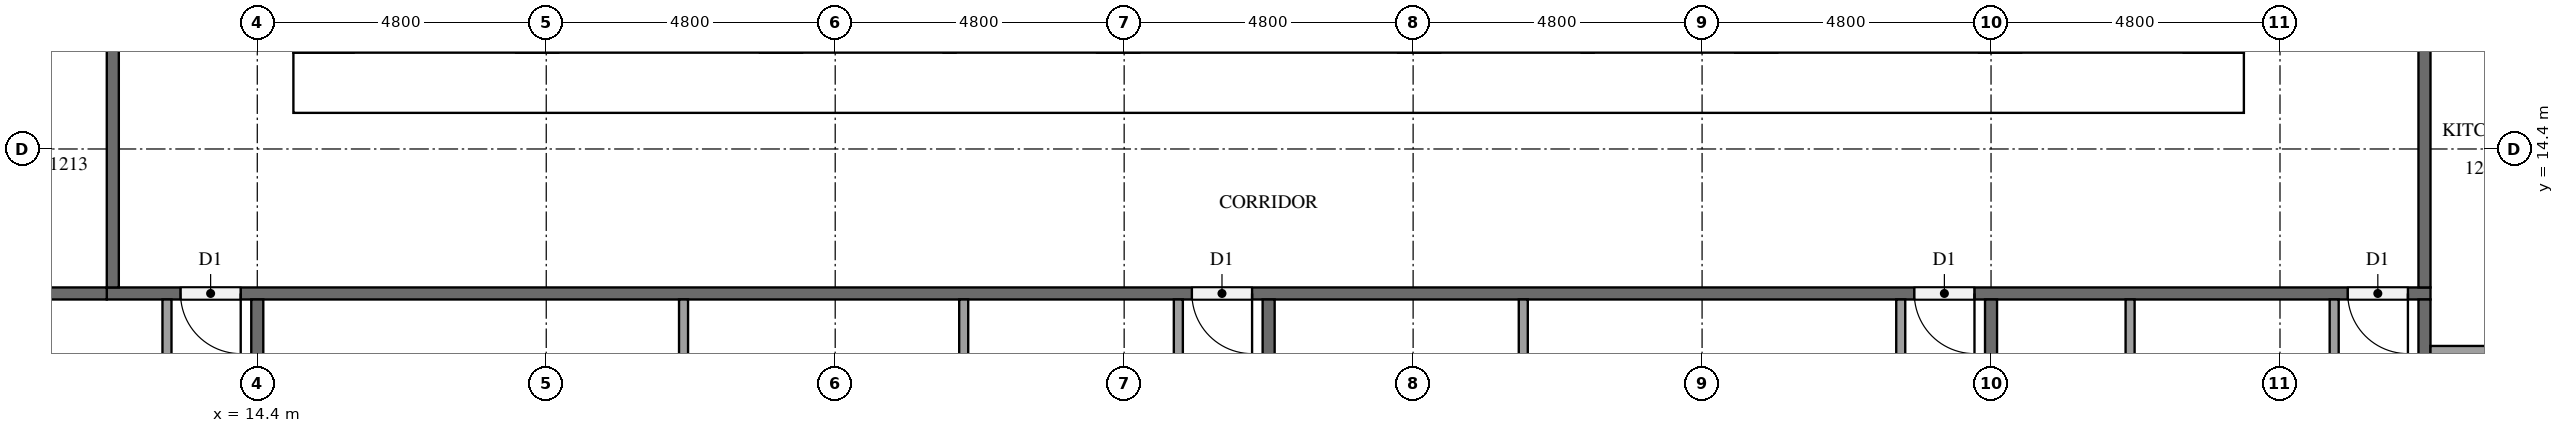
"""IFC4 building model, lengths in metres.
Left out: names, types, materials, properties, quantities, classifications, styles, units other than length and angle.
Written with IfcOpenShell. Run it as: python <this file> out.ifc"""

import sys

from ifc_helpers import new_model, si_unit, direction, frame, frame_2d, origin, place, context, subcontext, project, spatial, rectangle, extrude, element, fill, save


model = new_model("IFC4")
c1 = context("Model", 3, precision=1e-05, world=origin(), true_north=direction((0.0, 1.0)))
c2 = subcontext(c1, "Body", "Model", "MODEL_VIEW")
j1 = project(units=[si_unit("LENGTHUNIT", "METRE"), si_unit("PLANEANGLEUNIT", "RADIAN")], contexts=[c1])
p1 = place(None, origin())
s1 = spatial("IfcSite", under=j1, at=p1, CompositionType="ELEMENT")
p2 = place(p1, origin())
s2 = spatial("IfcBuilding", under=s1, at=p2, CompositionType="ELEMENT")
p3 = place(p2, frame((0.0, 0.0, 50.4)))
s3 = spatial("IfcBuildingStorey", under=s2, at=p3, CompositionType="ELEMENT", Elevation=50.4)
p4 = place(p3, frame((15.0, 15.5, 0.0), z_axis=(0.0, 0.0, 1.0), x_axis=(1.0, 0.0, 0.0)))
e1 = element("IfcWall", 1, at=p4, inside=s3, PredefinedType="SHEAR", context=c2, shape_type="SweptSolid", body=[
    extrude(rectangle(XDim=32.4, YDim=1.0, at=frame_2d((16.2, 0.0))), origin(), (0.0, 0.0, 1.0), 3.1),
])
p5 = place(p4, frame((15.3, 0.0, 0.0)))
e2 = element("IfcOpeningElement", 2, at=p5, cuts=e1, PredefinedType="OPENING", context=c2, shape_type="SweptSolid", body=[
    extrude(rectangle(XDim=1.8, YDim=2.1, at=frame_2d((0.9, 1.05))), frame((0.0, 0.51, 0.0), z_axis=(0.0, -1.0, 0.0), x_axis=(1.0, 0.0, 0.0)), (0.0, 0.0, 1.0), 1.02),
])
p6 = place(p3, frame((15.5, 16.0, 0.0), z_axis=(0.0, 0.0, 1.0), x_axis=(0.0, 1.0, 0.0)))
e3 = element("IfcWall", 3, at=p6, inside=s3, PredefinedType="SHEAR", context=c2, shape_type="SweptSolid", body=[
    extrude(rectangle(XDim=20.8, YDim=1.0, at=frame_2d((10.4, 0.0))), origin(), (0.0, 0.0, 1.0), 3.1),
])
p7 = place(p6, frame((4.76, 0.0, 0.0)))
e4 = element("IfcOpeningElement", 4, at=p7, cuts=e3, PredefinedType="OPENING", context=c2, shape_type="SweptSolid", body=[
    extrude(rectangle(XDim=1.2, YDim=2.1, at=frame_2d((0.6, 1.05))), frame((0.0, 0.51, 0.0), z_axis=(0.0, -1.0, 0.0), x_axis=(1.0, 0.0, 0.0)), (0.0, 0.0, 1.0), 1.02),
])
p8 = place(p3, frame((46.9, 16.0, 0.0), z_axis=(0.0, 0.0, 1.0), x_axis=(0.0, 1.0, 0.0)))
e5 = element("IfcWall", 5, at=p8, inside=s3, PredefinedType="SHEAR", context=c2, shape_type="SweptSolid", body=[
    extrude(rectangle(XDim=20.8, YDim=1.0, at=frame_2d((10.4, 0.0))), origin(), (0.0, 0.0, 1.0), 3.1),
])
p9 = place(p8, frame((10.1, 0.0, 0.0)))
e6 = element("IfcOpeningElement", 6, at=p9, cuts=e5, PredefinedType="OPENING", context=c2, shape_type="SweptSolid", body=[
    extrude(rectangle(XDim=1.2, YDim=2.1, at=frame_2d((0.6, 1.05))), frame((0.0, 0.51, 0.0), z_axis=(0.0, -1.0, 0.0), x_axis=(1.0, 0.0, 0.0)), (0.0, 0.0, 1.0), 1.02),
])
p10 = place(p3, frame((23.1, 16.0, 0.0), z_axis=(0.0, 0.0, 1.0), x_axis=(0.0, 1.0, 0.0)))
e7 = element("IfcWall", 7, at=p10, inside=s3, PredefinedType="SHEAR", context=c2, shape_type="SweptSolid", body=[
    extrude(rectangle(XDim=20.8, YDim=0.7, at=frame_2d((10.4, 0.0))), origin(), (0.0, 0.0, 1.0), 3.1),
])
p11 = place(p3, frame((50.5, 12.0, 0.0), z_axis=(0.0, 0.0, 1.0), x_axis=(-1.0, 0.0, 0.0)))
e8 = element("IfcWall", 8, at=p11, inside=s3, PredefinedType="PARTITIONING", context=c2, shape_type="SweptSolid", body=[
    extrude(rectangle(XDim=38.6, YDim=0.2, at=frame_2d((19.3, 0.0))), origin(), (0.0, 0.0, 1.0), 3.1),
])
p12 = place(p11, frame((36.375, 0.0, 0.0)))
e9 = element("IfcOpeningElement", 9, at=p12, cuts=e8, PredefinedType="OPENING", context=c2, shape_type="SweptSolid", body=[
    extrude(rectangle(XDim=1.0, YDim=2.1, at=frame_2d((0.5, 1.05))), frame((0.0, 0.11, 0.0), z_axis=(0.0, -1.0, 0.0), x_axis=(1.0, 0.0, 0.0)), (0.0, 0.0, 1.0), 0.22),
])
p13 = place(p11, frame((19.575, 0.0, 0.0)))
e10 = element("IfcOpeningElement", 10, at=p13, cuts=e8, PredefinedType="OPENING", context=c2, shape_type="SweptSolid", body=[
    extrude(rectangle(XDim=1.0, YDim=2.1, at=frame_2d((0.5, 1.05))), frame((0.0, 0.11, 0.0), z_axis=(0.0, -1.0, 0.0), x_axis=(1.0, 0.0, 0.0)), (0.0, 0.0, 1.0), 0.22),
])
p14 = place(p11, frame((7.575, 0.0, 0.0)))
e11 = element("IfcOpeningElement", 11, at=p14, cuts=e8, PredefinedType="OPENING", context=c2, shape_type="SweptSolid", body=[
    extrude(rectangle(XDim=1.0, YDim=2.1, at=frame_2d((0.5, 1.05))), frame((0.0, 0.11, 0.0), z_axis=(0.0, -1.0, 0.0), x_axis=(1.0, 0.0, 0.0)), (0.0, 0.0, 1.0), 0.22),
])
p15 = place(p11, frame((0.375, 0.0, 0.0)))
e12 = element("IfcOpeningElement", 12, at=p15, cuts=e8, PredefinedType="OPENING", context=c2, shape_type="SweptSolid", body=[
    extrude(rectangle(XDim=1.0, YDim=2.1, at=frame_2d((0.5, 1.05))), frame((0.0, 0.11, 0.0), z_axis=(0.0, -1.0, 0.0), x_axis=(1.0, 0.0, 0.0)), (0.0, 0.0, 1.0), 0.22),
])
p16 = place(p3, frame((50.4, 40.7, 0.0), z_axis=(0.0, 0.0, 1.0), x_axis=(0.0, -1.0, 0.0)))
e13 = element("IfcWall", 13, at=p16, inside=s3, PredefinedType="PARTITIONING", context=c2, shape_type="SweptSolid", body=[
    extrude(rectangle(XDim=28.6, YDim=0.2, at=frame_2d((14.3, 0.0))), origin(), (0.0, 0.0, 1.0), 3.1),
])
p17 = place(p16, frame((21.725, 0.0, 0.0)))
e14 = element("IfcOpeningElement", 14, at=p17, cuts=e13, PredefinedType="OPENING", context=c2, shape_type="SweptSolid", body=[
    extrude(rectangle(XDim=1.1, YDim=2.1, at=frame_2d((0.55, 1.05))), frame((0.0, 0.11, 0.0), z_axis=(0.0, -1.0, 0.0), x_axis=(1.0, 0.0, 0.0)), (0.0, 0.0, 1.0), 0.22),
])
p18 = place(p16, frame((12.175, 0.0, 0.0)))
e15 = element("IfcOpeningElement", 15, at=p18, cuts=e13, PredefinedType="OPENING", context=c2, shape_type="SweptSolid", body=[
    extrude(rectangle(XDim=1.0, YDim=2.1, at=frame_2d((0.5, 1.05))), frame((0.0, 0.11, 0.0), z_axis=(0.0, -1.0, 0.0), x_axis=(1.0, 0.0, 0.0)), (0.0, 0.0, 1.0), 0.22),
])
p19 = place(p16, frame((10.625, 0.0, 0.0)))
e16 = element("IfcOpeningElement", 16, at=p19, cuts=e13, PredefinedType="OPENING", context=c2, shape_type="SweptSolid", body=[
    extrude(rectangle(XDim=1.0, YDim=2.1, at=frame_2d((0.5, 1.05))), frame((0.0, 0.11, 0.0), z_axis=(0.0, -1.0, 0.0), x_axis=(1.0, 0.0, 0.0)), (0.0, 0.0, 1.0), 0.22),
])
p20 = place(p3, frame((12.0, 12.1, 0.0), z_axis=(0.0, 0.0, 1.0), x_axis=(0.0, 1.0, 0.0)))
e17 = element("IfcWall", 17, at=p20, inside=s3, PredefinedType="PARTITIONING", context=c2, shape_type="SweptSolid", body=[
    extrude(rectangle(XDim=28.6, YDim=0.2, at=frame_2d((14.3, 0.0))), origin(), (0.0, 0.0, 1.0), 3.1),
])
p21 = place(p20, frame((12.175, 0.0, 0.0)))
e18 = element("IfcOpeningElement", 18, at=p21, cuts=e17, PredefinedType="OPENING", context=c2, shape_type="SweptSolid", body=[
    extrude(rectangle(XDim=1.0, YDim=2.1, at=frame_2d((0.5, 1.05))), frame((0.0, 0.11, 0.0), z_axis=(0.0, -1.0, 0.0), x_axis=(1.0, 0.0, 0.0)), (0.0, 0.0, 1.0), 0.22),
])
p22 = place(p20, frame((10.625, 0.0, 0.0)))
e19 = element("IfcOpeningElement", 19, at=p22, cuts=e17, PredefinedType="OPENING", context=c2, shape_type="SweptSolid", body=[
    extrude(rectangle(XDim=1.0, YDim=2.1, at=frame_2d((0.5, 1.05))), frame((0.0, 0.11, 0.0), z_axis=(0.0, -1.0, 0.0), x_axis=(1.0, 0.0, 0.0)), (0.0, 0.0, 1.0), 0.22),
])
p23 = place(p3, frame((14.4, 11.9, 0.0), z_axis=(0.0, 0.0, 1.0), x_axis=(0.0, -1.0, 0.0)))
e20 = element("IfcWall", 20, at=p23, inside=s3, PredefinedType="PARTITIONING", context=c2, shape_type="SweptSolid", body=[
    extrude(rectangle(XDim=11.45, YDim=0.2, at=frame_2d((5.725, 0.0))), origin(), (0.0, 0.0, 1.0), 3.1),
])
for number, where, z_axis, x_axis in (
    (21, (0.1, 12.0, 0.0), (0.0, 0.0, 1.0), (1.0, 0.0, 0.0)),
    (22, (31.2, 11.9, 0.0), (0.0, 0.0, 1.0), (0.0, -1.0, 0.0)),
):
    element("IfcWall", number, at=place(p3, frame(where, z_axis=z_axis, x_axis=x_axis)), inside=s3, PredefinedType="PARTITIONING", context=c2, shape_type="SweptSolid", body=[
        extrude(rectangle(XDim=11.8, YDim=0.2, at=frame_2d((5.9, 0.0))), origin(), (0.0, 0.0, 1.0), 3.1),
    ])
p24 = place(p3, frame((43.2, 11.9, 0.0), z_axis=(0.0, 0.0, 1.0), x_axis=(0.0, -1.0, 0.0)))
e23 = element("IfcWall", 23, at=p24, inside=s3, PredefinedType="PARTITIONING", context=c2, shape_type="SweptSolid", body=[
    extrude(rectangle(XDim=11.45, YDim=0.2, at=frame_2d((5.725, 0.0))), origin(), (0.0, 0.0, 1.0), 3.1),
])
p25 = place(p3, frame((50.4, 11.9, 0.0), z_axis=(0.0, 0.0, 1.0), x_axis=(0.0, -1.0, 0.0)))
e24 = element("IfcWall", 24, at=p25, inside=s3, PredefinedType="PARTITIONING", context=c2, shape_type="SweptSolid", body=[
    extrude(rectangle(XDim=11.8, YDim=0.2, at=frame_2d((5.9, 0.0))), origin(), (0.0, 0.0, 1.0), 3.1),
])
p26 = place(p3, frame((12.9, 11.9, 0.0), z_axis=(0.0, 0.0, 1.0), x_axis=(0.0, -1.0, 0.0)))
e25 = element("IfcWall", 25, at=p26, inside=s3, PredefinedType="PARTITIONING", context=c2, shape_type="SweptSolid", body=[
    extrude(rectangle(XDim=4.025, YDim=0.15, at=frame_2d((2.012, 0.0))), origin(), (0.0, 0.0, 1.0), 3.1),
])
for number, where, z_axis, x_axis in (
    (26, (26.135, 11.9, 0.0), (0.0, 0.0, 1.0), (0.0, -1.0, 0.0)),
    (27, (21.481, 11.9, 0.0), (0.0, 0.0, 1.0), (0.0, -1.0, 0.0)),
):
    element("IfcWall", number, at=place(p3, frame(where, z_axis=z_axis, x_axis=x_axis)), inside=s3, PredefinedType="PARTITIONING", context=c2, shape_type="SweptSolid", body=[
        extrude(rectangle(XDim=3.575, YDim=0.15, at=frame_2d((1.788, 0.0))), origin(), (0.0, 0.0, 1.0), 3.1),
    ])
p27 = place(p3, frame((29.7, 11.9, 0.0), z_axis=(0.0, 0.0, 1.0), x_axis=(0.0, -1.0, 0.0)))
e28 = element("IfcWall", 28, at=p27, inside=s3, PredefinedType="PARTITIONING", context=c2, shape_type="SweptSolid", body=[
    extrude(rectangle(XDim=3.725, YDim=0.15, at=frame_2d((1.862, 0.0))), origin(), (0.0, 0.0, 1.0), 3.1),
])
p28 = place(p3, frame((35.43, 11.9, 0.0), z_axis=(0.0, 0.0, 1.0), x_axis=(0.0, -1.0, 0.0)))
e29 = element("IfcWall", 29, at=p28, inside=s3, PredefinedType="PARTITIONING", context=c2, shape_type="SweptSolid", body=[
    extrude(rectangle(XDim=3.275, YDim=0.15, at=frame_2d((1.637, 0.0))), origin(), (0.0, 0.0, 1.0), 3.1),
])
p29 = place(p3, frame((41.7, 11.9, 0.0), z_axis=(0.0, 0.0, 1.0), x_axis=(0.0, -1.0, 0.0)))
e30 = element("IfcWall", 30, at=p29, inside=s3, PredefinedType="PARTITIONING", context=c2, shape_type="SweptSolid", body=[
    extrude(rectangle(XDim=3.425, YDim=0.15, at=frame_2d((1.712, 0.0))), origin(), (0.0, 0.0, 1.0), 3.1),
])
p30 = place(p3, frame((45.51, 11.9, 0.0), z_axis=(0.0, 0.0, 1.0), x_axis=(0.0, -1.0, 0.0)))
e31 = element("IfcWall", 31, at=p30, inside=s3, PredefinedType="PARTITIONING", context=c2, shape_type="SweptSolid", body=[
    extrude(rectangle(XDim=3.125, YDim=0.15, at=frame_2d((1.562, 0.0))), origin(), (0.0, 0.0, 1.0), 3.1),
])
p31 = place(p3, frame((48.9, 11.9, 0.0), z_axis=(0.0, 0.0, 1.0), x_axis=(0.0, -1.0, 0.0)))
e32 = element("IfcWall", 32, at=p31, inside=s3, PredefinedType="PARTITIONING", context=c2, shape_type="SweptSolid", body=[
    extrude(rectangle(XDim=3.275, YDim=0.15, at=frame_2d((1.637, 0.0))), origin(), (0.0, 0.0, 1.0), 3.1),
])
p32 = place(p3, frame((50.5, 11.053, 0.0), z_axis=(0.0, 0.0, 1.0), x_axis=(1.0, 0.0, 0.0)))
e33 = element("IfcWall", 33, at=p32, inside=s3, PredefinedType="PARTITIONING", context=c2, shape_type="SweptSolid", body=[
    extrude(rectangle(XDim=1.775, YDim=0.15, at=frame_2d((0.887, 0.0))), origin(), (0.0, 0.0, 1.0), 3.1),
])
p33 = place(p5, frame((1.8, 0.0, 0.0), z_axis=(0.0, 0.0, 1.0), x_axis=(-1.0, 0.0, 0.0)))
e34 = element("IfcDoor", 34, at=p33, inside=s3, OperationType="DOUBLE_DOOR_SINGLE_SWING", PredefinedType="DOOR", context=c2, shape_type="SweptSolid", body=[
    extrude(rectangle(XDim=1.8, YDim=2.1, at=frame_2d((0.9, 1.05))), frame((0.0, 0.025, 0.0), z_axis=(0.0, -1.0, 0.0), x_axis=(1.0, 0.0, 0.0)), (0.0, 0.0, 1.0), 0.05),
])
fill(e2, e34)
p34 = place(p12, origin())
e35 = element("IfcDoor", 35, at=p34, inside=s3, OperationType="SINGLE_SWING_LEFT", PredefinedType="DOOR", context=c2, shape_type="SweptSolid", body=[
    extrude(rectangle(XDim=1.0, YDim=2.1, at=frame_2d((0.5, 1.05))), frame((0.0, 0.025, 0.0), z_axis=(0.0, -1.0, 0.0), x_axis=(1.0, 0.0, 0.0)), (0.0, 0.0, 1.0), 0.05),
])
fill(e9, e35)
p35 = place(p13, origin())
e36 = element("IfcDoor", 36, at=p35, inside=s3, OperationType="SINGLE_SWING_LEFT", PredefinedType="DOOR", context=c2, shape_type="SweptSolid", body=[
    extrude(rectangle(XDim=1.0, YDim=2.1, at=frame_2d((0.5, 1.05))), frame((0.0, 0.025, 0.0), z_axis=(0.0, -1.0, 0.0), x_axis=(1.0, 0.0, 0.0)), (0.0, 0.0, 1.0), 0.05),
])
fill(e10, e36)
p36 = place(p14, origin())
e37 = element("IfcDoor", 37, at=p36, inside=s3, OperationType="SINGLE_SWING_LEFT", PredefinedType="DOOR", context=c2, shape_type="SweptSolid", body=[
    extrude(rectangle(XDim=1.0, YDim=2.1, at=frame_2d((0.5, 1.05))), frame((0.0, 0.025, 0.0), z_axis=(0.0, -1.0, 0.0), x_axis=(1.0, 0.0, 0.0)), (0.0, 0.0, 1.0), 0.05),
])
fill(e11, e37)
p37 = place(p15, origin())
e38 = element("IfcDoor", 38, at=p37, inside=s3, OperationType="SINGLE_SWING_LEFT", PredefinedType="DOOR", context=c2, shape_type="SweptSolid", body=[
    extrude(rectangle(XDim=1.0, YDim=2.1, at=frame_2d((0.5, 1.05))), frame((0.0, 0.025, 0.0), z_axis=(0.0, -1.0, 0.0), x_axis=(1.0, 0.0, 0.0)), (0.0, 0.0, 1.0), 0.05),
])
fill(e12, e38)
save(model, sys.argv[1])
